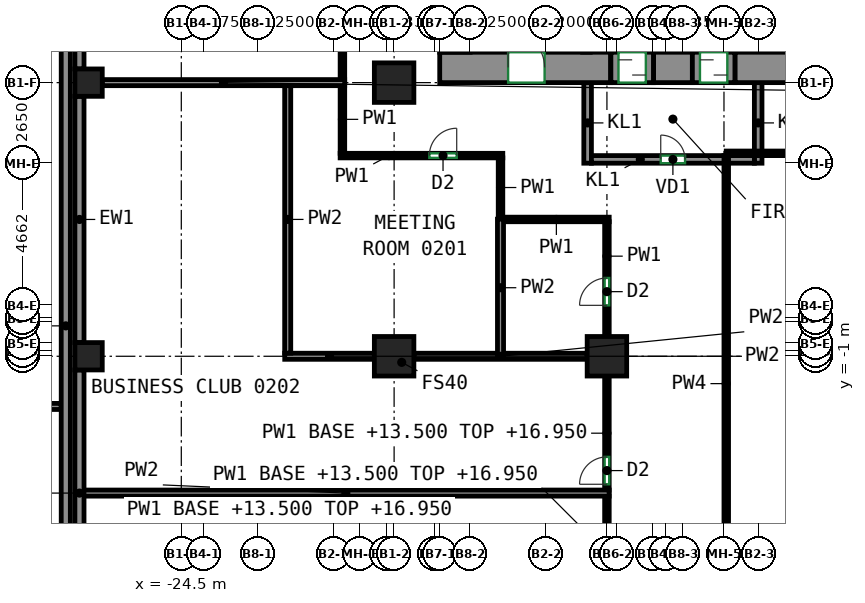
"""IFC4 building model, lengths in metres.
Left out: names, types, materials, properties, quantities, classifications, styles, units other than length and angle.
Written with IfcOpenShell. Run it as: python <this file> out.ifc"""

import sys

from ifc_helpers import new_model, si_unit, direction, frame, frame_2d, origin, origin_2d, place, context, subcontext, project, spatial, rectangle, extrude, source, transform, mapped, element, fill, save


model = new_model("IFC4")
c1 = context("Model", 3, precision=1e-05, world=origin(), true_north=direction((0.0, 1.0)))
c2 = subcontext(c1, "Body", "Model", "MODEL_VIEW")
j1 = project(units=[si_unit("LENGTHUNIT", "METRE"), si_unit("PLANEANGLEUNIT", "RADIAN")], contexts=[c1])
p1 = place(None, origin())
s1 = spatial("IfcSite", under=j1, at=p1, CompositionType="ELEMENT")
p2 = place(p1, origin())
s2 = spatial("IfcBuilding", under=s1, at=p2, CompositionType="ELEMENT")
p3 = place(p2, frame((0.0, 0.0, 13.5)))
s3 = spatial("IfcBuildingStorey", under=s2, at=p3, CompositionType="ELEMENT", Elevation=13.5)
m1 = source(origin(), c2, "Body", "SweptSolid", [
    extrude(rectangle(XDim=0.9, YDim=0.9, at=origin_2d()), origin(), (0.0, 0.0, 1.0), 4.1),
])
for number, where, z_axis, x_axis in (
    (1, (-27.55, -1.0, 0.0), (0.0, 0.0, 1.0), (1.0, 0.0, 0.0)),
    (2, (-27.55, 8.0, 0.0), (0.0, 0.0, 1.0), (1.0, 0.0, 0.0)),
):
    element("IfcColumn", number, at=place(p3, frame(where, z_axis=z_axis, x_axis=x_axis)), inside=s3, PredefinedType="COLUMN", context=c2, shape_type="MappedRepresentation", body=[
        mapped(m1, transform((0.0, 0.0, 0.0))),
    ])
m2 = source(origin(), c2, "Body", "SweptSolid", [
    extrude(rectangle(XDim=1.3, YDim=1.3, at=origin_2d()), origin(), (0.0, 0.0, 1.0), 4.1),
])
for number, where, z_axis, x_axis in (
    (3, (-17.5, -1.0, 0.0), (0.0, 0.0, 1.0), (1.0, 0.0, 0.0)),
    (4, (-17.5, 8.0, 0.0), (0.0, 0.0, 1.0), (1.0, 0.0, 0.0)),
    (5, (-10.5, -1.0, 0.0), (0.0, 0.0, 1.0), (1.0, 0.0, 0.0)),
):
    element("IfcColumn", number, at=place(p3, frame(where, z_axis=z_axis, x_axis=x_axis)), inside=s3, PredefinedType="COLUMN", context=c2, shape_type="MappedRepresentation", body=[
        mapped(m2, transform((0.0, 0.0, 0.0))),
    ])
m3 = source(origin(), c2, "Body", "SweptSolid", [
    extrude(rectangle(XDim=5.63, YDim=1.0, at=frame_2d((2.815, 0.0))), origin(), (0.0, 0.0, 1.0), 4.1),
])
p4 = place(p3, frame((-16.0, 8.5, 0.0), z_axis=(0.0, 0.0, 1.0), x_axis=(1.0, 0.0, 0.0)))
e6 = element("IfcWall", 6, at=p4, inside=s3, PredefinedType="SHEAR", context=c2, shape_type="MappedRepresentation", body=[
    mapped(m3, transform((0.0, 0.0, 0.0))),
])
p5 = place(p4, frame((2.25, 0.0, 0.0)))
e7 = element("IfcOpeningElement", 7, at=p5, cuts=e6, PredefinedType="OPENING", context=c2, shape_type="SweptSolid", body=[
    extrude(rectangle(XDim=1.2, YDim=2.1, at=frame_2d((0.6, 1.05))), frame((0.0, 0.51, 0.0), z_axis=(0.0, -1.0, 0.0), x_axis=(1.0, 0.0, 0.0)), (0.0, 0.0, 1.0), 1.02),
])
m4 = source(origin(), c2, "Body", "SweptSolid", [
    extrude(rectangle(XDim=1.28, YDim=1.0, at=frame_2d((0.64, 0.0))), origin(), (0.0, 0.0, 1.0), 4.1),
])
p6 = place(p3, frame((-8.97, 8.5, 0.0), z_axis=(0.0, 0.0, 1.0), x_axis=(1.0, 0.0, 0.0)))
e8 = element("IfcWall", 8, at=p6, inside=s3, PredefinedType="SHEAR", context=c2, shape_type="MappedRepresentation", body=[
    mapped(m4, transform((0.0, 0.0, 0.0))),
])
m5 = source(origin(), c2, "Body", "SweptSolid", [
    extrude(rectangle(XDim=14.18, YDim=1.0, at=frame_2d((7.09, 0.0))), origin(), (0.0, 0.0, 1.0), 4.1),
])
p7 = place(p3, frame((-6.29, 8.5, 0.0), z_axis=(0.0, 0.0, 1.0), x_axis=(1.0, 0.0, 0.0)))
e9 = element("IfcWall", 9, at=p7, inside=s3, PredefinedType="SHEAR", context=c2, shape_type="MappedRepresentation", body=[
    mapped(m5, transform((0.0, 0.0, 0.0))),
])
m6 = source(origin(), c2, "Body", "SweptSolid", [
    extrude(rectangle(XDim=1.4, YDim=1.0, at=frame_2d((0.7, 0.0))), origin(), (0.0, 0.0, 1.0), 0.2),
])
p8 = place(p3, frame((-10.37, 8.5, 3.9), z_axis=(0.0, 0.0, 1.0), x_axis=(1.0, 0.0, 0.0)))
e10 = element("IfcWall", 10, at=p8, inside=s3, PredefinedType="SHEAR", context=c2, shape_type="MappedRepresentation", body=[
    mapped(m6, transform((0.0, 0.0, 0.0))),
])
m7 = source(origin(), c2, "Body", "SweptSolid", [
    extrude(rectangle(XDim=15.282, YDim=0.3, at=frame_2d((7.641, 0.0))), origin(), (0.0, 0.0, 1.0), 4.1),
])
p9 = place(p3, frame((-27.85, 23.732, 0.0), z_axis=(0.0, 0.0, 1.0), x_axis=(0.0, -1.0, 0.0)))
e11 = element("IfcWall", 11, at=p9, inside=s3, PredefinedType="SOLIDWALL", context=c2, shape_type="MappedRepresentation", body=[
    mapped(m7, transform((0.0, 0.0, 0.0))),
])
m8 = source(origin(), c2, "Body", "SweptSolid", [
    extrude(rectangle(XDim=8.1, YDim=0.3, at=frame_2d((4.05, 0.0))), origin(), (0.0, 0.0, 1.0), 4.1),
])
for number, where, z_axis, x_axis in (
    (12, (-27.85, 7.55, 0.0), (0.0, 0.0, 1.0), (0.0, -1.0, 0.0)),
    (13, (-27.85, -1.45, 0.0), (0.0, 0.0, 1.0), (0.0, -1.0, 0.0)),
):
    element("IfcWall", number, at=place(p3, frame(where, z_axis=z_axis, x_axis=x_axis)), inside=s3, PredefinedType="SOLIDWALL", context=c2, shape_type="MappedRepresentation", body=[
        mapped(m8, transform((0.0, 0.0, 0.0))),
    ])
m9 = source(origin(), c2, "Body", "SweptSolid", [
    extrude(rectangle(XDim=56.3, YDim=0.3, at=frame_2d((28.15, 0.0))), origin(), (0.0, 0.0, 1.0), 4.1),
])
p10 = place(p3, frame((-28.3, 28.15, 0.0), z_axis=(0.0, 0.0, 1.0), x_axis=(0.0, -1.0, 0.0)))
e14 = element("IfcWall", 14, at=p10, inside=s3, PredefinedType="SOLIDWALL", context=c2, shape_type="MappedRepresentation", body=[
    mapped(m9, transform((0.0, 0.0, 0.0))),
])
m10 = source(origin(), c2, "Body", "SweptSolid", [
    extrude(rectangle(XDim=2.65, YDim=0.25, at=frame_2d((1.325, 0.0))), origin(), (0.0, 0.0, 1.0), 4.1),
])
for number, where, z_axis, x_axis in (
    (15, (-11.135, 5.35, 0.0), (0.0, 0.0, 1.0), (0.0, 1.0, 0.0)),
    (16, (-5.525, 5.35, 0.0), (0.0, 0.0, 1.0), (0.0, 1.0, 0.0)),
):
    element("IfcWall", number, at=place(p3, frame(where, z_axis=z_axis, x_axis=x_axis)), inside=s3, PredefinedType="PARTITIONING", context=c2, shape_type="MappedRepresentation", body=[
        mapped(m10, transform((0.0, 0.0, 0.0))),
    ])
m11 = source(origin(), c2, "Body", "SweptSolid", [
    extrude(rectangle(XDim=5.36, YDim=0.25, at=frame_2d((2.68, 0.0))), origin(), (0.0, 0.0, 1.0), 4.1),
])
p11 = place(p3, frame((-11.01, 5.475, 0.0), z_axis=(0.0, 0.0, 1.0), x_axis=(1.0, 0.0, 0.0)))
e17 = element("IfcWall", 17, at=p11, inside=s3, PredefinedType="PARTITIONING", context=c2, shape_type="MappedRepresentation", body=[
    mapped(m11, transform((0.0, 0.0, 0.0))),
])
p12 = place(p11, frame((2.28, 0.0, 0.0)))
e18 = element("IfcOpeningElement", 18, at=p12, cuts=e17, PredefinedType="OPENING", context=c2, shape_type="SweptSolid", body=[
    extrude(rectangle(XDim=0.8, YDim=2.0, at=frame_2d((0.4, 1.0))), frame((0.0, 0.135, 0.0), z_axis=(0.0, -1.0, 0.0), x_axis=(1.0, 0.0, 0.0)), (0.0, 0.0, 1.0), 0.27),
])
m12 = source(origin(), c2, "Body", "SweptSolid", [
    extrude(rectangle(XDim=1.4, YDim=1.0, at=frame_2d((0.7, 0.0))), origin(), (0.0, 0.0, 1.0), 2.7),
])
p13 = place(p3, frame((-10.37, 8.5, 0.0), z_axis=(0.0, 0.0, 1.0), x_axis=(1.0, 0.0, 0.0)))
e19 = element("IfcWall", 19, at=p13, inside=s3, PredefinedType="PARTITIONING", context=c2, shape_type="MappedRepresentation", body=[
    mapped(m12, transform((0.0, 0.0, 0.0))),
])
p14 = place(p13, frame((0.25, 0.0, 0.0)))
e20 = element("IfcOpeningElement", 20, at=p14, cuts=e19, PredefinedType="OPENING", context=c2, shape_type="SweptSolid", body=[
    extrude(rectangle(XDim=0.9, YDim=2.1, at=frame_2d((0.45, 1.05))), frame((0.0, 0.51, 0.0), z_axis=(0.0, -1.0, 0.0), x_axis=(1.0, 0.0, 0.0)), (0.0, 0.0, 1.0), 1.02),
])
m13 = source(origin(), c2, "Body", "SweptSolid", [
    extrude(rectangle(XDim=1.4, YDim=1.0, at=frame_2d((0.7, 0.0))), origin(), (0.0, 0.0, 1.0), 2.7),
])
p15 = place(p3, frame((-7.69, 8.5, 0.0), z_axis=(0.0, 0.0, 1.0), x_axis=(1.0, 0.0, 0.0)))
e21 = element("IfcWall", 21, at=p15, inside=s3, PredefinedType="PARTITIONING", context=c2, shape_type="MappedRepresentation", body=[
    mapped(m13, transform((0.0, 0.0, 0.0))),
])
p16 = place(p15, frame((0.25, 0.0, 0.0)))
e22 = element("IfcOpeningElement", 22, at=p16, cuts=e21, PredefinedType="OPENING", context=c2, shape_type="SweptSolid", body=[
    extrude(rectangle(XDim=0.9, YDim=2.1, at=frame_2d((0.45, 1.05))), frame((0.0, 0.51, 0.0), z_axis=(0.0, -1.0, 0.0), x_axis=(1.0, 0.0, 0.0)), (0.0, 0.0, 1.0), 1.02),
])
p17 = place(p3, frame((-10.5, -9.35, 0.0), z_axis=(0.0, 0.0, 1.0), x_axis=(0.0, 1.0, 0.0)))
e23 = element("IfcWall", 23, at=p17, inside=s3, PredefinedType="PARTITIONING", context=c2, shape_type="SweptSolid", body=[
    extrude(rectangle(XDim=3.76, YDim=0.15, at=frame_2d((1.88, 0.0))), origin(), (0.0, 0.0, 1.0), 3.45),
])
p18 = place(p3, frame((-10.5, -5.41, 0.0), z_axis=(0.0, 0.0, 1.0), x_axis=(0.0, 1.0, 0.0)))
e24 = element("IfcWall", 24, at=p18, inside=s3, PredefinedType="PARTITIONING", context=c2, shape_type="SweptSolid", body=[
    extrude(rectangle(XDim=3.76, YDim=0.15, at=frame_2d((1.88, 0.0))), origin(), (0.0, 0.0, 1.0), 3.45),
])
p19 = place(p18, frame((0.2, 0.0, 0.0)))
e25 = element("IfcOpeningElement", 25, at=p19, cuts=e24, PredefinedType="OPENING", context=c2, shape_type="SweptSolid", body=[
    extrude(rectangle(XDim=0.9, YDim=2.1, at=frame_2d((0.45, 1.05))), frame((0.0, 0.085, 0.0), z_axis=(0.0, -1.0, 0.0), x_axis=(1.0, 0.0, 0.0)), (0.0, 0.0, 1.0), 0.17),
])
p20 = place(p3, frame((-19.2, 8.09, 0.0), z_axis=(0.0, 0.0, 1.0), x_axis=(0.0, 1.0, 0.0)))
e26 = element("IfcWall", 26, at=p20, inside=s3, PredefinedType="PARTITIONING", context=c2, shape_type="SweptSolid", body=[
    extrude(rectangle(XDim=13.82, YDim=0.15, at=frame_2d((6.91, 0.0))), origin(), (0.0, 0.0, 1.0), 4.1),
])
p21 = place(p20, frame((6.51, 0.0, 0.0)))
e27 = element("IfcOpeningElement", 27, at=p21, cuts=e26, PredefinedType="OPENING", context=c2, shape_type="SweptSolid", body=[
    extrude(rectangle(XDim=0.9, YDim=2.1, at=frame_2d((0.45, 1.05))), frame((0.0, 0.085, 0.0), z_axis=(0.0, -1.0, 0.0), x_axis=(1.0, 0.0, 0.0)), (0.0, 0.0, 1.0), 0.17),
])
p22 = place(p3, frame((-14.0, 5.525, 0.0), z_axis=(0.0, 0.0, 1.0), x_axis=(0.0, -1.0, 0.0)))
e28 = element("IfcWall", 28, at=p22, inside=s3, PredefinedType="PARTITIONING", context=c2, shape_type="SweptSolid", body=[
    extrude(rectangle(XDim=1.95, YDim=0.15, at=frame_2d((0.975, 0.0))), origin(), (0.0, 0.0, 1.0), 4.1),
])
p23 = place(p3, frame((-19.275, 5.6, 0.0), z_axis=(0.0, 0.0, 1.0), x_axis=(1.0, 0.0, 0.0)))
e29 = element("IfcWall", 29, at=p23, inside=s3, PredefinedType="PARTITIONING", context=c2, shape_type="SweptSolid", body=[
    extrude(rectangle(XDim=5.35, YDim=0.15, at=frame_2d((2.675, 0.0))), origin(), (0.0, 0.0, 1.0), 4.1),
])
p24 = place(p23, frame((2.934, 0.0, 0.0)))
e30 = element("IfcOpeningElement", 30, at=p24, cuts=e29, PredefinedType="OPENING", context=c2, shape_type="SweptSolid", body=[
    extrude(rectangle(XDim=0.9, YDim=2.1, at=frame_2d((0.45, 1.05))), frame((0.0, 0.085, 0.0), z_axis=(0.0, -1.0, 0.0), x_axis=(1.0, 0.0, 0.0)), (0.0, 0.0, 1.0), 0.17),
])
p25 = place(p3, frame((-19.2, 5.675, 0.0), z_axis=(0.0, 0.0, 1.0), x_axis=(0.0, 1.0, 0.0)))
e31 = element("IfcWall", 31, at=p25, inside=s3, PredefinedType="PARTITIONING", context=c2, shape_type="SweptSolid", body=[
    extrude(rectangle(XDim=2.235, YDim=0.15, at=frame_2d((1.117, 0.0))), origin(), (0.0, 0.0, 1.0), 4.1),
])
p26 = place(p3, frame((-10.5, -0.35, 0.0), z_axis=(0.0, 0.0, 1.0), x_axis=(0.0, 1.0, 0.0)))
e32 = element("IfcWall", 32, at=p26, inside=s3, PredefinedType="PARTITIONING", context=c2, shape_type="SweptSolid", body=[
    extrude(rectangle(XDim=3.775, YDim=0.15, at=frame_2d((1.888, 0.0))), origin(), (0.0, 0.0, 1.0), 4.1),
])
p27 = place(p26, frame((1.025, 0.0, 0.0)))
e33 = element("IfcOpeningElement", 33, at=p27, cuts=e32, PredefinedType="OPENING", context=c2, shape_type="SweptSolid", body=[
    extrude(rectangle(XDim=0.9, YDim=2.1, at=frame_2d((0.45, 1.05))), frame((0.0, 0.085, 0.0), z_axis=(0.0, -1.0, 0.0), x_axis=(1.0, 0.0, 0.0)), (0.0, 0.0, 1.0), 0.17),
])
p28 = place(p3, frame((-13.901, 3.5, 0.0), z_axis=(0.0, 0.0, 1.0), x_axis=(1.0, 0.0, 0.0)))
e34 = element("IfcWall", 34, at=p28, inside=s3, PredefinedType="PARTITIONING", context=c2, shape_type="SweptSolid", body=[
    extrude(rectangle(XDim=3.476, YDim=0.15, at=frame_2d((1.738, 0.0))), origin(), (0.0, 0.0, 1.0), 4.1),
])
p29 = place(p3, frame((-27.75, -5.5, 0.0), z_axis=(0.0, 0.0, 1.0), x_axis=(1.0, 0.0, 0.0)))
e35 = element("IfcWall", 35, at=p29, inside=s3, PredefinedType="PARTITIONING", context=c2, shape_type="SweptSolid", body=[
    extrude(rectangle(XDim=17.324, YDim=0.2, at=frame_2d((8.662, 0.0))), origin(), (0.0, 0.0, 1.0), 4.1),
])
p30 = place(p3, frame((-27.1, 8.0, 0.0), z_axis=(0.0, 0.0, 1.0), x_axis=(1.0, 0.0, 0.0)))
e36 = element("IfcWall", 36, at=p30, inside=s3, PredefinedType="PARTITIONING", context=c2, shape_type="SweptSolid", body=[
    extrude(rectangle(XDim=7.974, YDim=0.2, at=frame_2d((3.987, 0.0))), origin(), (0.0, 0.0, 1.0), 3.45),
])
p31 = place(p3, frame((-21.098, -1.0, 0.0), z_axis=(0.0, 0.0, 1.0), x_axis=(1.0, 0.0, 0.0)))
e37 = element("IfcWall", 37, at=p31, inside=s3, PredefinedType="PARTITIONING", context=c2, shape_type="SweptSolid", body=[
    extrude(rectangle(XDim=2.948, YDim=0.2, at=frame_2d((1.474, 0.0))), origin(), (0.0, 0.0, 1.0), 3.45),
])
p32 = place(p3, frame((-16.85, -1.0, 0.0), z_axis=(0.0, 0.0, 1.0), x_axis=(1.0, 0.0, 0.0)))
e38 = element("IfcWall", 38, at=p32, inside=s3, PredefinedType="PARTITIONING", context=c2, shape_type="SweptSolid", body=[
    extrude(rectangle(XDim=5.7, YDim=0.2, at=frame_2d((2.85, 0.0))), origin(), (0.0, 0.0, 1.0), 3.45),
])
p33 = place(p3, frame((-21.0, -0.898, 0.0), z_axis=(0.0, 0.0, 1.0), x_axis=(0.0, 1.0, 0.0)))
e39 = element("IfcWall", 39, at=p33, inside=s3, PredefinedType="PARTITIONING", context=c2, shape_type="SweptSolid", body=[
    extrude(rectangle(XDim=8.798, YDim=0.2, at=frame_2d((4.399, 0.0))), origin(), (0.0, 0.0, 1.0), 4.1),
])
p34 = place(p3, frame((-14.0, -1.0, 0.0), z_axis=(0.0, 0.0, 1.0), x_axis=(-0.000216579128, 0.999999976547, 0.0)))
e40 = element("IfcWall", 40, at=p34, inside=s3, PredefinedType="PARTITIONING", context=c2, shape_type="SweptSolid", body=[
    extrude(rectangle(XDim=4.509, YDim=0.2, at=frame_2d((2.254, 0.0))), origin(), (0.0, 0.0, 1.0), 4.1),
])
p35 = place(p3, frame((-6.575, -9.4, 0.0), z_axis=(0.0, 0.0, 1.0), x_axis=(0.0, 1.0, 0.0)))
e41 = element("IfcWall", 41, at=p35, inside=s3, PredefinedType="PARTITIONING", context=c2, shape_type="SweptSolid", body=[
    extrude(rectangle(XDim=15.0, YDim=0.15, at=frame_2d((7.5, 0.0))), origin(), (0.0, 0.0, 1.0), 4.1),
])
p36 = place(p3, frame((-6.575, 5.675, 0.0), z_axis=(0.0, 0.0, 1.0), x_axis=(1.0, 0.0, 0.0)))
e42 = element("IfcWall", 42, at=p36, inside=s3, PredefinedType="PARTITIONING", context=c2, shape_type="SweptSolid", body=[
    extrude(rectangle(XDim=15.075, YDim=0.15, at=frame_2d((7.538, 0.0))), origin(), (0.0, 0.0, 1.0), 4.1),
])
m14 = source(origin(), c2, "Body", "SweptSolid", [
    extrude(rectangle(XDim=10.1, YDim=0.2, at=frame_2d((5.05, 0.0))), origin(), (0.0, 0.0, 1.0), 3.3),
])
p37 = place(p3, frame((-38.55, -2.65, 0.0), z_axis=(0.0, 0.0, 1.0), x_axis=(1.0, 0.0, 0.0)))
e43 = element("IfcWall", 43, at=p37, inside=s3, PredefinedType="PARTITIONING", context=c2, shape_type="MappedRepresentation", body=[
    mapped(m14, transform((0.0, 0.0, 0.0))),
])
p38 = place(p12, origin())
e44 = element("IfcDoor", 44, at=p38, inside=s3, OperationType="SINGLE_SWING_LEFT", PredefinedType="DOOR", context=c2, shape_type="SweptSolid", body=[
    extrude(rectangle(XDim=0.8, YDim=2.0, at=frame_2d((0.4, 1.0))), frame((0.0, 0.025, 0.0), z_axis=(0.0, -1.0, 0.0), x_axis=(1.0, 0.0, 0.0)), (0.0, 0.0, 1.0), 0.05),
])
fill(e18, e44)
p39 = place(p14, origin())
e45 = element("IfcDoor", 45, at=p39, inside=s3, OperationType="SLIDING_TO_LEFT", PredefinedType="DOOR", context=c2, shape_type="SweptSolid", body=[
    extrude(rectangle(XDim=0.9, YDim=2.1, at=frame_2d((0.45, 1.05))), frame((0.0, 0.405, 0.0), z_axis=(0.0, -1.0, 0.0), x_axis=(1.0, 0.0, 0.0)), (0.0, 0.0, 1.0), 0.05),
])
fill(e20, e45)
p40 = place(p16, origin())
e46 = element("IfcDoor", 46, at=p40, inside=s3, OperationType="SLIDING_TO_RIGHT", PredefinedType="DOOR", context=c2, shape_type="SweptSolid", body=[
    extrude(rectangle(XDim=0.9, YDim=2.1, at=frame_2d((0.45, 1.05))), frame((0.0, 0.405, 0.0), z_axis=(0.0, -1.0, 0.0), x_axis=(1.0, 0.0, 0.0)), (0.0, 0.0, 1.0), 0.05),
])
fill(e22, e46)
p41 = place(p5, origin())
e47 = element("IfcDoor", 47, at=p41, inside=s3, OperationType="DOUBLE_DOOR_SINGLE_SWING", PredefinedType="DOOR", context=c2, shape_type="SweptSolid", body=[
    extrude(rectangle(XDim=1.2, YDim=2.1, at=frame_2d((0.6, 1.05))), frame((0.0, 0.405, 0.0), z_axis=(0.0, -1.0, 0.0), x_axis=(1.0, 0.0, 0.0)), (0.0, 0.0, 1.0), 0.05),
])
fill(e7, e47)
p42 = place(p19, origin())
e48 = element("IfcDoor", 48, at=p42, inside=s3, OperationType="SINGLE_SWING_LEFT", PredefinedType="DOOR", context=c2, shape_type="SweptSolid", body=[
    extrude(rectangle(XDim=0.9, YDim=2.1, at=frame_2d((0.45, 1.05))), frame((0.0, 0.025, 0.0), z_axis=(0.0, -1.0, 0.0), x_axis=(1.0, 0.0, 0.0)), (0.0, 0.0, 1.0), 0.05),
])
fill(e25, e48)
p43 = place(p27, origin())
e49 = element("IfcDoor", 49, at=p43, inside=s3, OperationType="SINGLE_SWING_LEFT", PredefinedType="DOOR", context=c2, shape_type="SweptSolid", body=[
    extrude(rectangle(XDim=0.9, YDim=2.1, at=frame_2d((0.45, 1.05))), frame((0.0, 0.025, 0.0), z_axis=(0.0, -1.0, 0.0), x_axis=(1.0, 0.0, 0.0)), (0.0, 0.0, 1.0), 0.05),
])
fill(e33, e49)
p44 = place(p24, origin())
e50 = element("IfcDoor", 50, at=p44, inside=s3, OperationType="SINGLE_SWING_RIGHT", PredefinedType="DOOR", context=c2, shape_type="SweptSolid", body=[
    extrude(rectangle(XDim=0.9, YDim=2.1, at=frame_2d((0.45, 1.05))), frame((0.0, 0.025, 0.0), z_axis=(0.0, -1.0, 0.0), x_axis=(1.0, 0.0, 0.0)), (0.0, 0.0, 1.0), 0.05),
])
fill(e30, e50)
save(model, sys.argv[1])
